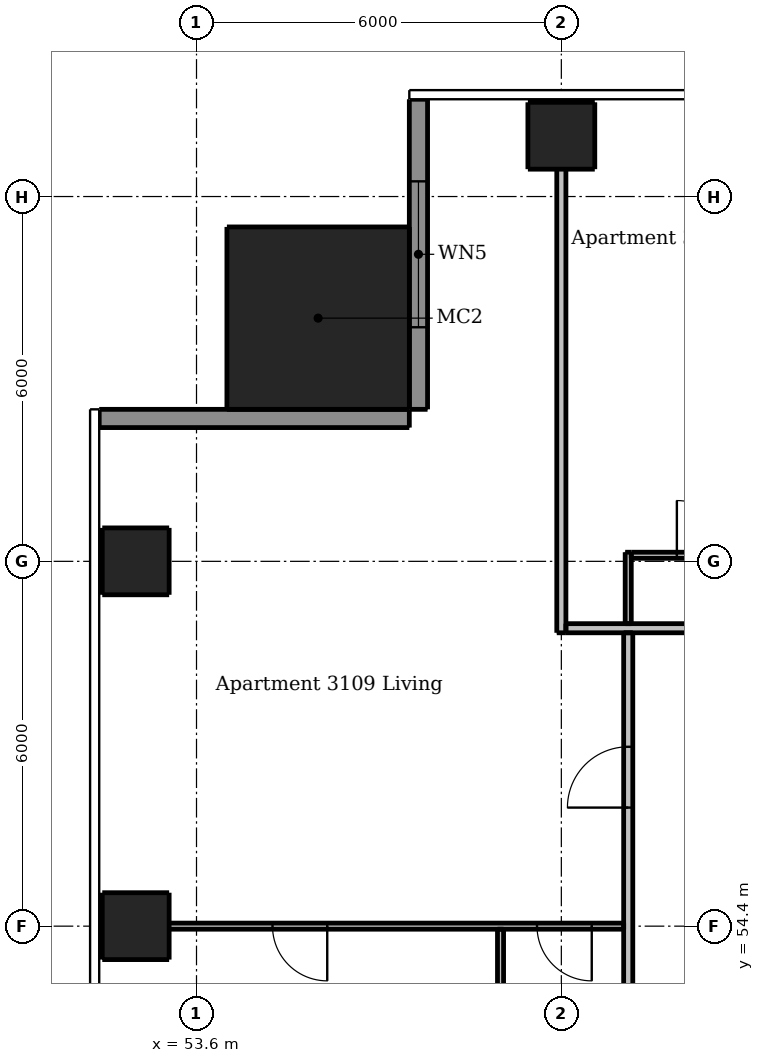
"""IFC4 building model, lengths in metres.
Left out: names, types, materials, properties, quantities, classifications, styles, units other than length and angle.
Written with IfcOpenShell. Run it as: python <this file> out.ifc"""

import sys

from ifc_helpers import new_model, si_unit, direction, frame, frame_2d, origin, origin_2d, place, context, subcontext, project, spatial, rectangle, extrude, element, fill, save


model = new_model("IFC4")
c1 = context("Model", 3, precision=1e-05, world=origin(), true_north=direction((0.0, 1.0)))
c2 = subcontext(c1, "Body", "Model", "MODEL_VIEW")
j1 = project(units=[si_unit("LENGTHUNIT", "METRE"), si_unit("PLANEANGLEUNIT", "RADIAN")], contexts=[c1])
p1 = place(None, origin())
s1 = spatial("IfcSite", under=j1, at=p1, CompositionType="ELEMENT")
p2 = place(p1, origin())
s2 = spatial("IfcBuilding", under=s1, at=p2, CompositionType="ELEMENT")
p3 = place(p2, frame((0.0, 0.0, 115.0)))
s3 = spatial("IfcBuildingStorey", under=s2, at=p3, CompositionType="ELEMENT", Elevation=115.0)
for number, where, z_axis, x_axis in (
    (1, (59.6, 67.4, 0.0), (0.0, 0.0, 1.0), (1.0, 0.0, 0.0)),
    (2, (52.6, 54.4, 0.0), (0.0, 0.0, 1.0), (1.0, 0.0, 0.0)),
    (3, (52.6, 60.4, 0.0), (0.0, 0.0, 1.0), (1.0, 0.0, 0.0)),
):
    element("IfcColumn", number, at=place(p3, frame(where, z_axis=z_axis, x_axis=x_axis)), inside=s3, PredefinedType="COLUMN", context=c2, shape_type="SweptSolid", body=[
        extrude(rectangle(XDim=1.1, YDim=1.1, at=origin_2d()), origin(), (0.0, 0.0, 1.0), 3.05),
    ])
p4 = place(p3, frame((55.6, 64.4, 0.0), z_axis=(0.0, 0.0, 1.0), x_axis=(1.0, 0.0, 0.0)))
e4 = element("IfcColumn", 4, at=p4, inside=s3, PredefinedType="COLUMN", context=c2, shape_type="SweptSolid", body=[
    extrude(rectangle(XDim=3.0, YDim=3.0, at=origin_2d()), origin(), (0.0, 0.0, 1.0), 3.3),
])
p5 = place(p3, frame((57.25, 68.0, 0.0), z_axis=(0.0, 0.0, 1.0), x_axis=(0.0, -1.0, 0.0)))
e5 = element("IfcWall", 5, at=p5, inside=s3, PredefinedType="SOLIDWALL", context=c2, shape_type="SweptSolid", body=[
    extrude(rectangle(XDim=5.1, YDim=0.3, at=frame_2d((2.55, 0.0))), origin(), (0.0, 0.0, 1.0), 3.05),
])
p6 = place(p5, frame((1.35, 0.0, 0.15)))
e6 = element("IfcOpeningElement", 6, at=p6, cuts=e5, PredefinedType="OPENING", context=c2, shape_type="SweptSolid", body=[
    extrude(rectangle(XDim=2.4, YDim=2.1, at=frame_2d((1.2, 1.05))), frame((0.0, 0.16, 0.0), z_axis=(0.0, -1.0, 0.0), x_axis=(1.0, 0.0, 0.0)), (0.0, 0.0, 1.0), 0.32),
])
p7 = place(p3, frame((57.1, 62.75, 0.0), z_axis=(0.0, 0.0, 1.0), x_axis=(-1.0, 0.0, 0.0)))
e7 = element("IfcWall", 7, at=p7, inside=s3, PredefinedType="SOLIDWALL", context=c2, shape_type="SweptSolid", body=[
    extrude(rectangle(XDim=5.1, YDim=0.3, at=frame_2d((2.55, 0.0))), origin(), (0.0, 0.0, 1.0), 3.05),
])
p8 = place(p3, frame((58.6, 54.35, 0.0), z_axis=(0.0, 0.0, 1.0), x_axis=(0.0, -1.0, 0.0)))
e8 = element("IfcWall", 8, at=p8, inside=s3, PredefinedType="PARTITIONING", context=c2, shape_type="SweptSolid", body=[
    extrude(rectangle(XDim=5.875, YDim=0.1, at=frame_2d((2.938, 0.0))), origin(), (0.0, 0.0, 1.0), 3.05),
])
p9 = place(p8, frame((3.75, 0.0, 0.0)))
e9 = element("IfcOpeningElement", 9, at=p9, cuts=e8, PredefinedType="OPENING", context=c2, shape_type="SweptSolid", body=[
    extrude(rectangle(XDim=0.8, YDim=2.1, at=frame_2d((0.4, 1.05))), frame((0.0, 0.06, 0.0), z_axis=(0.0, -1.0, 0.0), x_axis=(1.0, 0.0, 0.0)), (0.0, 0.0, 1.0), 0.12),
])
p10 = place(p3, frame((60.7, 59.375, 0.0), z_axis=(0.0, 0.0, 1.0), x_axis=(0.0, 1.0, 0.0)))
e10 = element("IfcWall", 10, at=p10, inside=s3, PredefinedType="PARTITIONING", context=c2, shape_type="SweptSolid", body=[
    extrude(rectangle(XDim=1.175, YDim=0.1, at=frame_2d((0.587, 0.0))), origin(), (0.0, 0.0, 1.0), 3.05),
])
p11 = place(p3, frame((60.75, 60.5, 0.0), z_axis=(0.0, 0.0, 1.0), x_axis=(1.0, 0.0, 0.0)))
e11 = element("IfcWall", 11, at=p11, inside=s3, PredefinedType="PARTITIONING", context=c2, shape_type="SweptSolid", body=[
    extrude(rectangle(XDim=16.775, YDim=0.1, at=frame_2d((8.387, 0.0))), origin(), (0.0, 0.0, 1.0), 3.05),
])
p12 = place(p11, frame((9.8, 0.0, 0.0)))
e12 = element("IfcOpeningElement", 12, at=p12, cuts=e11, PredefinedType="OPENING", context=c2, shape_type="SweptSolid", body=[
    extrude(rectangle(XDim=0.9, YDim=2.1, at=frame_2d((0.45, 1.05))), frame((0.0, 0.06, 0.0), z_axis=(0.0, -1.0, 0.0), x_axis=(1.0, 0.0, 0.0)), (0.0, 0.0, 1.0), 0.12),
])
p13 = place(p11, frame((14.9, 0.0, 0.0)))
e13 = element("IfcOpeningElement", 13, at=p13, cuts=e11, PredefinedType="OPENING", context=c2, shape_type="SweptSolid", body=[
    extrude(rectangle(XDim=0.9, YDim=2.1, at=frame_2d((0.45, 1.05))), frame((0.0, 0.06, 0.0), z_axis=(0.0, -1.0, 0.0), x_axis=(1.0, 0.0, 0.0)), (0.0, 0.0, 1.0), 0.12),
])
p14 = place(p11, frame((12.5, 0.0, 0.0)))
e14 = element("IfcOpeningElement", 14, at=p14, cuts=e11, PredefinedType="OPENING", context=c2, shape_type="SweptSolid", body=[
    extrude(rectangle(XDim=0.9, YDim=2.1, at=frame_2d((0.45, 1.05))), frame((0.0, 0.06, 0.0), z_axis=(0.0, -1.0, 0.0), x_axis=(1.0, 0.0, 0.0)), (0.0, 0.0, 1.0), 0.12),
])
p15 = place(p11, frame((5.3, 0.0, 0.0)))
e15 = element("IfcOpeningElement", 15, at=p15, cuts=e11, PredefinedType="OPENING", context=c2, shape_type="SweptSolid", body=[
    extrude(rectangle(XDim=0.9, YDim=2.1, at=frame_2d((0.45, 1.05))), frame((0.0, 0.06, 0.0), z_axis=(0.0, -1.0, 0.0), x_axis=(1.0, 0.0, 0.0)), (0.0, 0.0, 1.0), 0.12),
])
p16 = place(p11, frame((7.15, 0.0, 0.0)))
e16 = element("IfcOpeningElement", 16, at=p16, cuts=e11, PredefinedType="OPENING", context=c2, shape_type="SweptSolid", body=[
    extrude(rectangle(XDim=0.8, YDim=2.1, at=frame_2d((0.4, 1.05))), frame((0.0, 0.06, 0.0), z_axis=(0.0, -1.0, 0.0), x_axis=(1.0, 0.0, 0.0)), (0.0, 0.0, 1.0), 0.12),
])
p17 = place(p11, frame((0.75, 0.0, 0.0)))
e17 = element("IfcOpeningElement", 17, at=p17, cuts=e11, PredefinedType="OPENING", context=c2, shape_type="SweptSolid", body=[
    extrude(rectangle(XDim=0.9, YDim=2.1, at=frame_2d((0.45, 1.05))), frame((0.0, 0.06, 0.0), z_axis=(0.0, -1.0, 0.0), x_axis=(1.0, 0.0, 0.0)), (0.0, 0.0, 1.0), 0.12),
])
p18 = place(p11, frame((3.25, 0.0, 0.0)))
e18 = element("IfcOpeningElement", 18, at=p18, cuts=e11, PredefinedType="OPENING", context=c2, shape_type="SweptSolid", body=[
    extrude(rectangle(XDim=0.8, YDim=2.1, at=frame_2d((0.4, 1.05))), frame((0.0, 0.06, 0.0), z_axis=(0.0, -1.0, 0.0), x_axis=(1.0, 0.0, 0.0)), (0.0, 0.0, 1.0), 0.12),
])
p19 = place(p3, frame((60.625, 54.4, 0.0), z_axis=(0.0, 0.0, 1.0), x_axis=(-1.0, 0.0, 0.0)))
e19 = element("IfcWall", 19, at=p19, inside=s3, PredefinedType="PARTITIONING", context=c2, shape_type="SweptSolid", body=[
    extrude(rectangle(XDim=8.625, YDim=0.1, at=frame_2d((4.312, 0.0))), origin(), (0.0, 0.0, 1.0), 2.516),
])
p20 = place(p19, frame((0.525, 0.0, 0.0)))
e20 = element("IfcOpeningElement", 20, at=p20, cuts=e19, PredefinedType="OPENING", context=c2, shape_type="SweptSolid", body=[
    extrude(rectangle(XDim=0.9, YDim=2.1, at=frame_2d((0.45, 1.05))), frame((0.0, 0.06, 0.0), z_axis=(0.0, -1.0, 0.0), x_axis=(1.0, 0.0, 0.0)), (0.0, 0.0, 1.0), 0.12),
])
p21 = place(p19, frame((4.875, 0.0, 0.0)))
e21 = element("IfcOpeningElement", 21, at=p21, cuts=e19, PredefinedType="OPENING", context=c2, shape_type="SweptSolid", body=[
    extrude(rectangle(XDim=0.9, YDim=2.1, at=frame_2d((0.45, 1.05))), frame((0.0, 0.06, 0.0), z_axis=(0.0, -1.0, 0.0), x_axis=(1.0, 0.0, 0.0)), (0.0, 0.0, 1.0), 0.12),
])
p22 = place(p3, frame((59.6, 59.225, 0.0), z_axis=(0.0, 0.0, 1.0), x_axis=(0.0, 1.0, 0.0)))
e22 = element("IfcWall", 22, at=p22, inside=s3, PredefinedType="PARTITIONING", context=c2, shape_type="SweptSolid", body=[
    extrude(rectangle(XDim=8.775, YDim=0.15, at=frame_2d((4.387, 0.0))), origin(), (0.0, 0.0, 1.0), 2.51),
])
p23 = place(p3, frame((60.7, 30.325, 0.0), z_axis=(0.0, 0.0, 1.0), x_axis=(0.0, 1.0, 0.0)))
e23 = element("IfcWall", 23, at=p23, inside=s3, PredefinedType="PARTITIONING", context=c2, shape_type="SweptSolid", body=[
    extrude(rectangle(XDim=28.9, YDim=0.15, at=frame_2d((14.45, 0.0))), origin(), (0.0, 0.0, 1.0), 3.05),
])
p24 = place(p23, frame((9.225, 0.0, 0.0)))
e24 = element("IfcOpeningElement", 24, at=p24, cuts=e23, PredefinedType="OPENING", context=c2, shape_type="SweptSolid", body=[
    extrude(rectangle(XDim=1.0, YDim=2.1, at=frame_2d((0.5, 1.05))), frame((0.0, 0.085, 0.0), z_axis=(0.0, -1.0, 0.0), x_axis=(1.0, 0.0, 0.0)), (0.0, 0.0, 1.0), 0.17),
])
p25 = place(p23, frame((26.025, 0.0, 0.0)))
e25 = element("IfcOpeningElement", 25, at=p25, cuts=e23, PredefinedType="OPENING", context=c2, shape_type="SweptSolid", body=[
    extrude(rectangle(XDim=1.0, YDim=2.1, at=frame_2d((0.5, 1.05))), frame((0.0, 0.085, 0.0), z_axis=(0.0, -1.0, 0.0), x_axis=(1.0, 0.0, 0.0)), (0.0, 0.0, 1.0), 0.17),
])
p26 = place(p3, frame((59.675, 59.3, 0.0), z_axis=(0.0, 0.0, 1.0), x_axis=(1.0, 0.0, 0.0)))
e26 = element("IfcWall", 26, at=p26, inside=s3, PredefinedType="PARTITIONING", context=c2, shape_type="SweptSolid", body=[
    extrude(rectangle(XDim=28.55, YDim=0.15, at=frame_2d((14.275, 0.0))), origin(), (0.0, 0.0, 1.0), 3.05),
])
p27 = place(p26, frame((8.975, 0.0, 0.0)))
e27 = element("IfcOpeningElement", 27, at=p27, cuts=e26, PredefinedType="OPENING", context=c2, shape_type="SweptSolid", body=[
    extrude(rectangle(XDim=1.0, YDim=2.1, at=frame_2d((0.5, 1.05))), frame((0.0, 0.085, 0.0), z_axis=(0.0, -1.0, 0.0), x_axis=(1.0, 0.0, 0.0)), (0.0, 0.0, 1.0), 0.17),
])
p28 = place(p26, frame((25.775, 0.0, 0.0)))
e28 = element("IfcOpeningElement", 28, at=p28, cuts=e26, PredefinedType="OPENING", context=c2, shape_type="SweptSolid", body=[
    extrude(rectangle(XDim=1.0, YDim=2.1, at=frame_2d((0.5, 1.05))), frame((0.0, 0.085, 0.0), z_axis=(0.0, -1.0, 0.0), x_axis=(1.0, 0.0, 0.0)), (0.0, 0.0, 1.0), 0.17),
])
p29 = place(p6, origin())
e29 = element("IfcWindow", 29, at=p29, inside=s3, PartitioningType="DOUBLE_PANEL_VERTICAL", PredefinedType="WINDOW", context=c2, shape_type="SweptSolid", body=[
    extrude(rectangle(XDim=2.4, YDim=2.1, at=frame_2d((1.2, 1.05))), frame((0.0, 0.03, 0.0), z_axis=(0.0, -1.0, 0.0), x_axis=(1.0, 0.0, 0.0)), (0.0, 0.0, 1.0), 0.06),
])
fill(e6, e29)
p30 = place(p17, origin())
e30 = element("IfcDoor", 30, at=p30, inside=s3, OperationType="SINGLE_SWING_LEFT", PredefinedType="DOOR", context=c2, shape_type="SweptSolid", body=[
    extrude(rectangle(XDim=0.9, YDim=2.1, at=frame_2d((0.45, 1.05))), frame((0.0, 0.025, 0.0), z_axis=(0.0, -1.0, 0.0), x_axis=(1.0, 0.0, 0.0)), (0.0, 0.0, 1.0), 0.05),
])
fill(e17, e30)
p31 = place(p25, origin())
e31 = element("IfcDoor", 31, at=p31, inside=s3, OperationType="SINGLE_SWING_LEFT", PredefinedType="DOOR", context=c2, shape_type="SweptSolid", body=[
    extrude(rectangle(XDim=1.0, YDim=2.1, at=frame_2d((0.5, 1.05))), frame((0.0, 0.025, 0.0), z_axis=(0.0, -1.0, 0.0), x_axis=(1.0, 0.0, 0.0)), (0.0, 0.0, 1.0), 0.05),
])
fill(e25, e31)
p32 = place(p20, origin())
e32 = element("IfcDoor", 32, at=p32, inside=s3, OperationType="SINGLE_SWING_LEFT", PredefinedType="DOOR", context=c2, shape_type="SweptSolid", body=[
    extrude(rectangle(XDim=0.9, YDim=2.1, at=frame_2d((0.45, 1.05))), frame((0.0, 0.025, 0.0), z_axis=(0.0, -1.0, 0.0), x_axis=(1.0, 0.0, 0.0)), (0.0, 0.0, 1.0), 0.05),
])
fill(e20, e32)
p33 = place(p21, origin())
e33 = element("IfcDoor", 33, at=p33, inside=s3, OperationType="SINGLE_SWING_LEFT", PredefinedType="DOOR", context=c2, shape_type="SweptSolid", body=[
    extrude(rectangle(XDim=0.9, YDim=2.1, at=frame_2d((0.45, 1.05))), frame((0.0, 0.025, 0.0), z_axis=(0.0, -1.0, 0.0), x_axis=(1.0, 0.0, 0.0)), (0.0, 0.0, 1.0), 0.05),
])
fill(e21, e33)
save(model, sys.argv[1])
